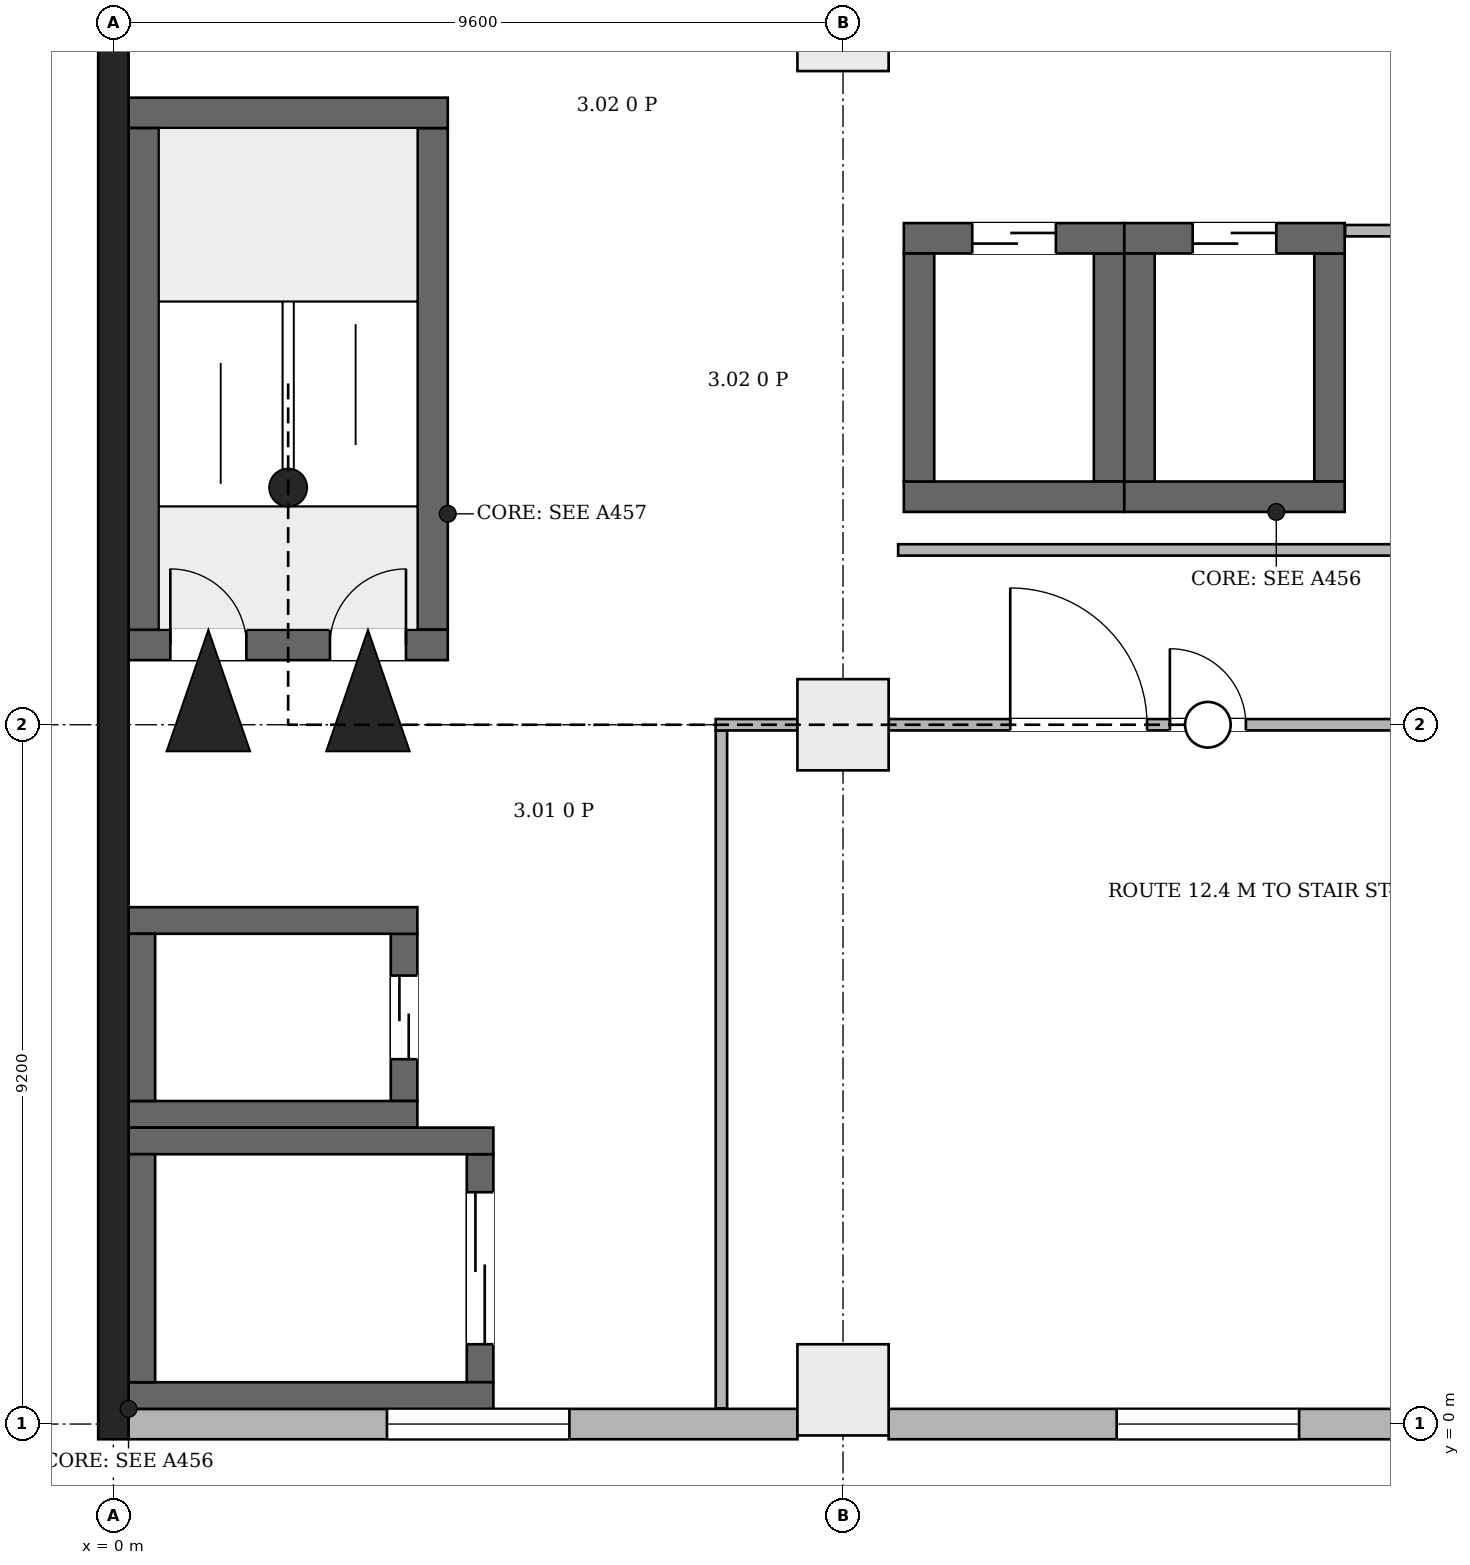
"""IFC4 building model, lengths in metres.
Left out: names, types, materials, properties, quantities, classifications, styles, units other than length and angle.
Written with IfcOpenShell. Run it as: python <this file> out.ifc"""

import sys

from ifc_helpers import new_model, si_unit, direction, frame, frame_2d, origin, origin_2d, place, context, subcontext, project, spatial, rectangle, extrude, element, fill, save


model = new_model("IFC4")
c1 = context("Model", 3, precision=1e-05, world=origin(), true_north=direction((0.0, 1.0)))
c2 = subcontext(c1, "Body", "Model", "MODEL_VIEW")
j1 = project(units=[si_unit("LENGTHUNIT", "METRE"), si_unit("PLANEANGLEUNIT", "RADIAN")], contexts=[c1])
p1 = place(None, origin())
s1 = spatial("IfcSite", under=j1, at=p1, CompositionType="ELEMENT")
p2 = place(p1, origin())
s2 = spatial("IfcBuilding", under=s1, at=p2, CompositionType="ELEMENT")
p3 = place(p2, frame((0.0, 0.0, 21.7)))
s3 = spatial("IfcBuildingStorey", under=s2, at=p3, CompositionType="ELEMENT", Elevation=21.7)
p4 = place(p3, frame((0.0, -0.2, 0.0), z_axis=(0.0, 0.0, 1.0), x_axis=(0.0, 1.0, 0.0)))
e1 = element("IfcWall", 1, at=p4, inside=s3, PredefinedType="SHEAR", context=c2, shape_type="SweptSolid", body=[
    extrude(rectangle(XDim=46.88, YDim=0.4, at=frame_2d((23.44, 0.0))), origin(), (0.0, 0.0, 1.0), 5.0),
])
p5 = place(p3, frame((0.2, 10.25, 0.0), z_axis=(0.0, 0.0, 1.0), x_axis=(1.0, 0.0, 0.0)))
e2 = element("IfcWall", 2, at=p5, inside=s3, PredefinedType="SHEAR", context=c2, shape_type="SweptSolid", body=[
    extrude(rectangle(XDim=4.2, YDim=0.4, at=frame_2d((2.1, 0.0))), origin(), (0.0, 0.0, 1.0), 5.0),
])
p6 = place(p5, frame((0.55, 0.0, 0.0)))
e3 = element("IfcOpeningElement", 3, at=p6, cuts=e2, PredefinedType="OPENING", context=c2, shape_type="SweptSolid", body=[
    extrude(rectangle(XDim=1.0, YDim=2.1, at=frame_2d((0.5, 1.05))), frame((0.0, 0.21, 0.0), z_axis=(0.0, -1.0, 0.0), x_axis=(1.0, 0.0, 0.0)), (0.0, 0.0, 1.0), 0.42),
])
p7 = place(p5, frame((2.65, 0.0, 0.0)))
e4 = element("IfcOpeningElement", 4, at=p7, cuts=e2, PredefinedType="OPENING", context=c2, shape_type="SweptSolid", body=[
    extrude(rectangle(XDim=1.0, YDim=2.1, at=frame_2d((0.5, 1.05))), frame((0.0, 0.21, 0.0), z_axis=(0.0, -1.0, 0.0), x_axis=(1.0, 0.0, 0.0)), (0.0, 0.0, 1.0), 0.42),
])
p8 = place(p3, frame((0.2, 17.25, 0.0), z_axis=(0.0, 0.0, 1.0), x_axis=(1.0, 0.0, 0.0)))
e5 = element("IfcWall", 5, at=p8, inside=s3, PredefinedType="SHEAR", context=c2, shape_type="SweptSolid", body=[
    extrude(rectangle(XDim=4.2, YDim=0.4, at=frame_2d((2.1, 0.0))), origin(), (0.0, 0.0, 1.0), 5.0),
])
for number, where, z_axis, x_axis in (
    (6, (0.4, 10.45, 0.0), (0.0, 0.0, 1.0), (0.0, 1.0, 0.0)),
    (7, (4.2, 10.45, 0.0), (0.0, 0.0, 1.0), (0.0, 1.0, 0.0)),
):
    element("IfcWall", number, at=place(p3, frame(where, z_axis=z_axis, x_axis=x_axis)), inside=s3, PredefinedType="SHEAR", context=c2, shape_type="SweptSolid", body=[
        extrude(rectangle(XDim=6.6, YDim=0.4, at=frame_2d((3.3, 0.0))), origin(), (0.0, 0.0, 1.0), 5.0),
    ])
for number, where, z_axis, x_axis in (
    (8, (0.2, 0.375, 0.0), (0.0, 0.0, 1.0), (1.0, 0.0, 0.0)),
    (9, (0.2, 3.725, 0.0), (0.0, 0.0, 1.0), (1.0, 0.0, 0.0)),
):
    element("IfcWall", number, at=place(p3, frame(where, z_axis=z_axis, x_axis=x_axis)), inside=s3, PredefinedType="SHEAR", context=c2, shape_type="SweptSolid", body=[
        extrude(rectangle(XDim=4.8, YDim=0.35, at=frame_2d((2.4, 0.0))), origin(), (0.0, 0.0, 1.0), 5.0),
    ])
p9 = place(p3, frame((0.375, 0.55, 0.0), z_axis=(0.0, 0.0, 1.0), x_axis=(0.0, 1.0, 0.0)))
e10 = element("IfcWall", 10, at=p9, inside=s3, PredefinedType="SHEAR", context=c2, shape_type="SweptSolid", body=[
    extrude(rectangle(XDim=3.0, YDim=0.35, at=frame_2d((1.5, 0.0))), origin(), (0.0, 0.0, 1.0), 5.0),
])
p10 = place(p3, frame((4.825, 0.55, 0.0), z_axis=(0.0, 0.0, 1.0), x_axis=(0.0, 1.0, 0.0)))
e11 = element("IfcWall", 11, at=p10, inside=s3, PredefinedType="SHEAR", context=c2, shape_type="SweptSolid", body=[
    extrude(rectangle(XDim=3.0, YDim=0.35, at=frame_2d((1.5, 0.0))), origin(), (0.0, 0.0, 1.0), 5.0),
])
p11 = place(p10, frame((0.5, 0.0, 0.0)))
e12 = element("IfcOpeningElement", 12, at=p11, cuts=e11, PredefinedType="OPENING", context=c2, shape_type="SweptSolid", body=[
    extrude(rectangle(XDim=2.0, YDim=2.4, at=frame_2d((1.0, 1.2))), frame((0.0, 0.185, 0.0), z_axis=(0.0, -1.0, 0.0), x_axis=(1.0, 0.0, 0.0)), (0.0, 0.0, 1.0), 0.37),
])
for number, where, z_axis, x_axis in (
    (13, (0.2, 4.075, 0.0), (0.0, 0.0, 1.0), (1.0, 0.0, 0.0)),
    (14, (0.2, 6.625, 0.0), (0.0, 0.0, 1.0), (1.0, 0.0, 0.0)),
):
    element("IfcWall", number, at=place(p3, frame(where, z_axis=z_axis, x_axis=x_axis)), inside=s3, PredefinedType="SHEAR", context=c2, shape_type="SweptSolid", body=[
        extrude(rectangle(XDim=3.8, YDim=0.35, at=frame_2d((1.9, 0.0))), origin(), (0.0, 0.0, 1.0), 5.0),
    ])
p12 = place(p3, frame((0.375, 4.25, 0.0), z_axis=(0.0, 0.0, 1.0), x_axis=(0.0, 1.0, 0.0)))
e15 = element("IfcWall", 15, at=p12, inside=s3, PredefinedType="SHEAR", context=c2, shape_type="SweptSolid", body=[
    extrude(rectangle(XDim=2.2, YDim=0.35, at=frame_2d((1.1, 0.0))), origin(), (0.0, 0.0, 1.0), 5.0),
])
p13 = place(p3, frame((3.825, 4.25, 0.0), z_axis=(0.0, 0.0, 1.0), x_axis=(0.0, 1.0, 0.0)))
e16 = element("IfcWall", 16, at=p13, inside=s3, PredefinedType="SHEAR", context=c2, shape_type="SweptSolid", body=[
    extrude(rectangle(XDim=2.2, YDim=0.35, at=frame_2d((1.1, 0.0))), origin(), (0.0, 0.0, 1.0), 5.0),
])
p14 = place(p13, frame((0.55, 0.0, 0.0)))
e17 = element("IfcOpeningElement", 17, at=p14, cuts=e16, PredefinedType="OPENING", context=c2, shape_type="SweptSolid", body=[
    extrude(rectangle(XDim=1.1, YDim=2.1, at=frame_2d((0.55, 1.05))), frame((0.0, 0.185, 0.0), z_axis=(0.0, -1.0, 0.0), x_axis=(1.0, 0.0, 0.0)), (0.0, 0.0, 1.0), 0.37),
])
p15 = place(p3, frame((10.4, 12.2, 0.0), z_axis=(0.0, 0.0, 1.0), x_axis=(1.0, 0.0, 0.0)))
e18 = element("IfcWall", 18, at=p15, inside=s3, PredefinedType="SHEAR", context=c2, shape_type="SweptSolid", body=[
    extrude(rectangle(XDim=2.9, YDim=0.4, at=frame_2d((1.45, 0.0))), origin(), (0.0, 0.0, 1.0), 5.0),
])
p16 = place(p3, frame((10.4, 15.6, 0.0), z_axis=(0.0, 0.0, 1.0), x_axis=(1.0, 0.0, 0.0)))
e19 = element("IfcWall", 19, at=p16, inside=s3, PredefinedType="SHEAR", context=c2, shape_type="SweptSolid", body=[
    extrude(rectangle(XDim=2.9, YDim=0.4, at=frame_2d((1.45, 0.0))), origin(), (0.0, 0.0, 1.0), 5.0),
])
p17 = place(p16, frame((0.9, 0.0, 0.0)))
e20 = element("IfcOpeningElement", 20, at=p17, cuts=e19, PredefinedType="OPENING", context=c2, shape_type="SweptSolid", body=[
    extrude(rectangle(XDim=1.1, YDim=2.1, at=frame_2d((0.55, 1.05))), frame((0.0, 0.21, 0.0), z_axis=(0.0, -1.0, 0.0), x_axis=(1.0, 0.0, 0.0)), (0.0, 0.0, 1.0), 0.42),
])
for number, where, z_axis, x_axis in (
    (21, (10.6, 12.4, 0.0), (0.0, 0.0, 1.0), (0.0, 1.0, 0.0)),
    (22, (13.1, 12.4, 0.0), (0.0, 0.0, 1.0), (0.0, 1.0, 0.0)),
):
    element("IfcWall", number, at=place(p3, frame(where, z_axis=z_axis, x_axis=x_axis)), inside=s3, PredefinedType="SHEAR", context=c2, shape_type="SweptSolid", body=[
        extrude(rectangle(XDim=3.0, YDim=0.4, at=frame_2d((1.5, 0.0))), origin(), (0.0, 0.0, 1.0), 5.0),
    ])
p18 = place(p3, frame((13.3, 12.2, 0.0), z_axis=(0.0, 0.0, 1.0), x_axis=(1.0, 0.0, 0.0)))
e23 = element("IfcWall", 23, at=p18, inside=s3, PredefinedType="SHEAR", context=c2, shape_type="SweptSolid", body=[
    extrude(rectangle(XDim=2.9, YDim=0.4, at=frame_2d((1.45, 0.0))), origin(), (0.0, 0.0, 1.0), 5.0),
])
p19 = place(p3, frame((13.3, 15.6, 0.0), z_axis=(0.0, 0.0, 1.0), x_axis=(1.0, 0.0, 0.0)))
e24 = element("IfcWall", 24, at=p19, inside=s3, PredefinedType="SHEAR", context=c2, shape_type="SweptSolid", body=[
    extrude(rectangle(XDim=2.9, YDim=0.4, at=frame_2d((1.45, 0.0))), origin(), (0.0, 0.0, 1.0), 5.0),
])
p20 = place(p19, frame((0.9, 0.0, 0.0)))
e25 = element("IfcOpeningElement", 25, at=p20, cuts=e24, PredefinedType="OPENING", context=c2, shape_type="SweptSolid", body=[
    extrude(rectangle(XDim=1.1, YDim=2.1, at=frame_2d((0.55, 1.05))), frame((0.0, 0.21, 0.0), z_axis=(0.0, -1.0, 0.0), x_axis=(1.0, 0.0, 0.0)), (0.0, 0.0, 1.0), 0.42),
])
for number, where, z_axis, x_axis in (
    (26, (13.5, 12.4, 0.0), (0.0, 0.0, 1.0), (0.0, 1.0, 0.0)),
    (27, (16.0, 12.4, 0.0), (0.0, 0.0, 1.0), (0.0, 1.0, 0.0)),
):
    element("IfcWall", number, at=place(p3, frame(where, z_axis=z_axis, x_axis=x_axis)), inside=s3, PredefinedType="SHEAR", context=c2, shape_type="SweptSolid", body=[
        extrude(rectangle(XDim=3.0, YDim=0.4, at=frame_2d((1.5, 0.0))), origin(), (0.0, 0.0, 1.0), 5.0),
    ])
for number, where, z_axis, x_axis in (
    (28, (9.6, 0.45, 0.0), (0.0, 0.0, 1.0), (1.0, 0.0, 0.0)),
    (29, (9.6, 9.2, 0.0), (0.0, 0.0, 1.0), (1.0, 0.0, 0.0)),
    (30, (9.6, 18.4, 0.0), (0.0, 0.0, 1.0), (1.0, 0.0, 0.0)),
):
    element("IfcColumn", number, at=place(p3, frame(where, z_axis=z_axis, x_axis=x_axis)), inside=s3, PredefinedType="COLUMN", context=c2, shape_type="SweptSolid", body=[
        extrude(rectangle(XDim=1.2, YDim=1.2, at=origin_2d()), origin(), (0.0, 0.0, 1.0), 5.0),
    ])
p21 = place(p3, frame((0.2, 0.0, 0.0), z_axis=(0.0, 0.0, 1.0), x_axis=(1.0, 0.0, 0.0)))
e31 = element("IfcWall", 31, at=p21, inside=s3, PredefinedType="ELEMENTEDWALL", context=c2, shape_type="SweptSolid", body=[
    extrude(rectangle(XDim=8.8, YDim=0.4, at=frame_2d((4.4, 0.0))), origin(), (0.0, 0.0, 1.0), 4.65),
])
p22 = place(p21, frame((3.4, 0.0, 1.0)))
e32 = element("IfcOpeningElement", 32, at=p22, cuts=e31, PredefinedType="OPENING", context=c2, shape_type="SweptSolid", body=[
    extrude(rectangle(XDim=2.4, YDim=2.2, at=frame_2d((1.2, 1.1))), frame((0.0, 0.21, 0.0), z_axis=(0.0, -1.0, 0.0), x_axis=(1.0, 0.0, 0.0)), (0.0, 0.0, 1.0), 0.42),
])
p23 = place(p3, frame((10.2, 0.0, 0.0), z_axis=(0.0, 0.0, 1.0), x_axis=(1.0, 0.0, 0.0)))
e33 = element("IfcWall", 33, at=p23, inside=s3, PredefinedType="ELEMENTEDWALL", context=c2, shape_type="SweptSolid", body=[
    extrude(rectangle(XDim=8.4, YDim=0.4, at=frame_2d((4.2, 0.0))), origin(), (0.0, 0.0, 1.0), 4.65),
])
p24 = place(p23, frame((3.0, 0.0, 1.0)))
e34 = element("IfcOpeningElement", 34, at=p24, cuts=e33, PredefinedType="OPENING", context=c2, shape_type="SweptSolid", body=[
    extrude(rectangle(XDim=2.4, YDim=2.2, at=frame_2d((1.2, 1.1))), frame((0.0, 0.21, 0.0), z_axis=(0.0, -1.0, 0.0), x_axis=(1.0, 0.0, 0.0)), (0.0, 0.0, 1.0), 0.42),
])
p25 = place(p3, frame((8.0, 0.206, 0.0), z_axis=(0.0, 0.0, 1.0), x_axis=(0.0, 1.0, 0.0)))
e35 = element("IfcWall", 35, at=p25, inside=s3, PredefinedType="PARTITIONING", context=c2, shape_type="SweptSolid", body=[
    extrude(rectangle(XDim=8.919, YDim=0.15, at=frame_2d((4.459, 0.0))), origin(), (0.0, 0.0, 1.0), 4.65),
])
p26 = place(p3, frame((7.925, 9.2, 0.0), z_axis=(0.0, 0.0, 1.0), x_axis=(1.0, 0.0, 0.0)))
e36 = element("IfcWall", 36, at=p26, inside=s3, PredefinedType="PARTITIONING", context=c2, shape_type="SweptSolid", body=[
    extrude(rectangle(XDim=1.075, YDim=0.15, at=frame_2d((0.538, 0.0))), origin(), (0.0, 0.0, 1.0), 4.25),
])
p27 = place(p3, frame((10.2, 9.2, 0.0), z_axis=(0.0, 0.0, 1.0), x_axis=(1.0, 0.0, 0.0)))
e37 = element("IfcWall", 37, at=p27, inside=s3, PredefinedType="PARTITIONING", context=c2, shape_type="SweptSolid", body=[
    extrude(rectangle(XDim=8.4, YDim=0.15, at=frame_2d((4.2, 0.0))), origin(), (0.0, 0.0, 1.0), 4.25),
])
p28 = place(p27, frame((3.7, 0.0, 0.0)))
e38 = element("IfcOpeningElement", 38, at=p28, cuts=e37, PredefinedType="OPENING", context=c2, shape_type="SweptSolid", body=[
    extrude(rectangle(XDim=1.0, YDim=2.1, at=frame_2d((0.5, 1.05))), frame((0.0, 0.085, 0.0), z_axis=(0.0, -1.0, 0.0), x_axis=(1.0, 0.0, 0.0)), (0.0, 0.0, 1.0), 0.17),
])
p29 = place(p27, frame((1.6, 0.0, 0.0)))
e39 = element("IfcOpeningElement", 39, at=p29, cuts=e37, PredefinedType="OPENING", context=c2, shape_type="SweptSolid", body=[
    extrude(rectangle(XDim=1.8, YDim=2.1, at=frame_2d((0.9, 1.05))), frame((0.0, 0.085, 0.0), z_axis=(0.0, -1.0, 0.0), x_axis=(1.0, 0.0, 0.0)), (0.0, 0.0, 1.0), 0.17),
])
p30 = place(p3, frame((10.325, 11.5, 0.0), z_axis=(0.0, 0.0, 1.0), x_axis=(1.0, 0.0, 0.0)))
e40 = element("IfcWall", 40, at=p30, inside=s3, PredefinedType="PARTITIONING", context=c2, shape_type="SweptSolid", body=[
    extrude(rectangle(XDim=9.569, YDim=0.15, at=frame_2d((4.785, 0.0))), origin(), (0.0, 0.0, 1.0), 4.65),
])
p31 = place(p3, frame((16.206, 15.7, 0.0), z_axis=(0.0, 0.0, 1.0), x_axis=(1.0, 0.0, 0.0)))
e41 = element("IfcWall", 41, at=p31, inside=s3, PredefinedType="PARTITIONING", context=c2, shape_type="SweptSolid", body=[
    extrude(rectangle(XDim=3.688, YDim=0.15, at=frame_2d((1.844, 0.0))), origin(), (0.0, 0.0, 1.0), 4.65),
])
p32 = place(p22, origin())
e42 = element("IfcWindow", 42, at=p32, inside=s3, PartitioningType="SINGLE_PANEL", PredefinedType="WINDOW", context=c2, shape_type="SweptSolid", body=[
    extrude(rectangle(XDim=2.4, YDim=2.2, at=frame_2d((1.2, 1.1))), frame((0.0, 0.03, 0.0), z_axis=(0.0, -1.0, 0.0), x_axis=(1.0, 0.0, 0.0)), (0.0, 0.0, 1.0), 0.06),
])
fill(e32, e42)
p33 = place(p24, origin())
e43 = element("IfcWindow", 43, at=p33, inside=s3, PartitioningType="SINGLE_PANEL", PredefinedType="WINDOW", context=c2, shape_type="SweptSolid", body=[
    extrude(rectangle(XDim=2.4, YDim=2.2, at=frame_2d((1.2, 1.1))), frame((0.0, 0.03, 0.0), z_axis=(0.0, -1.0, 0.0), x_axis=(1.0, 0.0, 0.0)), (0.0, 0.0, 1.0), 0.06),
])
fill(e34, e43)
p34 = place(p6, origin())
e44 = element("IfcDoor", 44, at=p34, inside=s3, OperationType="SINGLE_SWING_RIGHT", PredefinedType="DOOR", context=c2, shape_type="SweptSolid", body=[
    extrude(rectangle(XDim=1.0, YDim=2.1, at=frame_2d((0.5, 1.05))), frame((0.0, 0.025, 0.0), z_axis=(0.0, -1.0, 0.0), x_axis=(1.0, 0.0, 0.0)), (0.0, 0.0, 1.0), 0.05),
])
fill(e3, e44)
p35 = place(p7, origin())
e45 = element("IfcDoor", 45, at=p35, inside=s3, OperationType="SINGLE_SWING_LEFT", PredefinedType="DOOR", context=c2, shape_type="SweptSolid", body=[
    extrude(rectangle(XDim=1.0, YDim=2.1, at=frame_2d((0.5, 1.05))), frame((0.0, 0.025, 0.0), z_axis=(0.0, -1.0, 0.0), x_axis=(1.0, 0.0, 0.0)), (0.0, 0.0, 1.0), 0.05),
])
fill(e4, e45)
p36 = place(p11, origin())
e46 = element("IfcDoor", 46, at=p36, inside=s3, OperationType="DOUBLE_DOOR_SLIDING", PredefinedType="DOOR", context=c2, shape_type="SweptSolid", body=[
    extrude(rectangle(XDim=2.0, YDim=2.4, at=frame_2d((1.0, 1.2))), frame((0.0, 0.025, 0.0), z_axis=(0.0, -1.0, 0.0), x_axis=(1.0, 0.0, 0.0)), (0.0, 0.0, 1.0), 0.05),
])
fill(e12, e46)
p37 = place(p14, origin())
e47 = element("IfcDoor", 47, at=p37, inside=s3, OperationType="DOUBLE_DOOR_SLIDING", PredefinedType="DOOR", context=c2, shape_type="SweptSolid", body=[
    extrude(rectangle(XDim=1.1, YDim=2.1, at=frame_2d((0.55, 1.05))), frame((0.0, 0.025, 0.0), z_axis=(0.0, -1.0, 0.0), x_axis=(1.0, 0.0, 0.0)), (0.0, 0.0, 1.0), 0.05),
])
fill(e17, e47)
p38 = place(p17, origin())
e48 = element("IfcDoor", 48, at=p38, inside=s3, OperationType="DOUBLE_DOOR_SLIDING", PredefinedType="DOOR", context=c2, shape_type="SweptSolid", body=[
    extrude(rectangle(XDim=1.1, YDim=2.1, at=frame_2d((0.55, 1.05))), frame((0.0, 0.025, 0.0), z_axis=(0.0, -1.0, 0.0), x_axis=(1.0, 0.0, 0.0)), (0.0, 0.0, 1.0), 0.05),
])
fill(e20, e48)
p39 = place(p20, origin())
e49 = element("IfcDoor", 49, at=p39, inside=s3, OperationType="DOUBLE_DOOR_SLIDING", PredefinedType="DOOR", context=c2, shape_type="SweptSolid", body=[
    extrude(rectangle(XDim=1.1, YDim=2.1, at=frame_2d((0.55, 1.05))), frame((0.0, 0.025, 0.0), z_axis=(0.0, -1.0, 0.0), x_axis=(1.0, 0.0, 0.0)), (0.0, 0.0, 1.0), 0.05),
])
fill(e25, e49)
p40 = place(p28, origin())
e50 = element("IfcDoor", 50, at=p40, inside=s3, OperationType="SINGLE_SWING_LEFT", PredefinedType="DOOR", context=c2, shape_type="SweptSolid", body=[
    extrude(rectangle(XDim=1.0, YDim=2.1, at=frame_2d((0.5, 1.05))), frame((0.0, 0.025, 0.0), z_axis=(0.0, -1.0, 0.0), x_axis=(1.0, 0.0, 0.0)), (0.0, 0.0, 1.0), 0.05),
])
fill(e38, e50)
p41 = place(p29, origin())
e51 = element("IfcDoor", 51, at=p41, inside=s3, OperationType="DOUBLE_DOOR_SINGLE_SWING", PredefinedType="DOOR", context=c2, shape_type="SweptSolid", body=[
    extrude(rectangle(XDim=1.8, YDim=2.1, at=frame_2d((0.9, 1.05))), frame((0.0, 0.025, 0.0), z_axis=(0.0, -1.0, 0.0), x_axis=(1.0, 0.0, 0.0)), (0.0, 0.0, 1.0), 0.05),
])
fill(e39, e51)
save(model, sys.argv[1])
